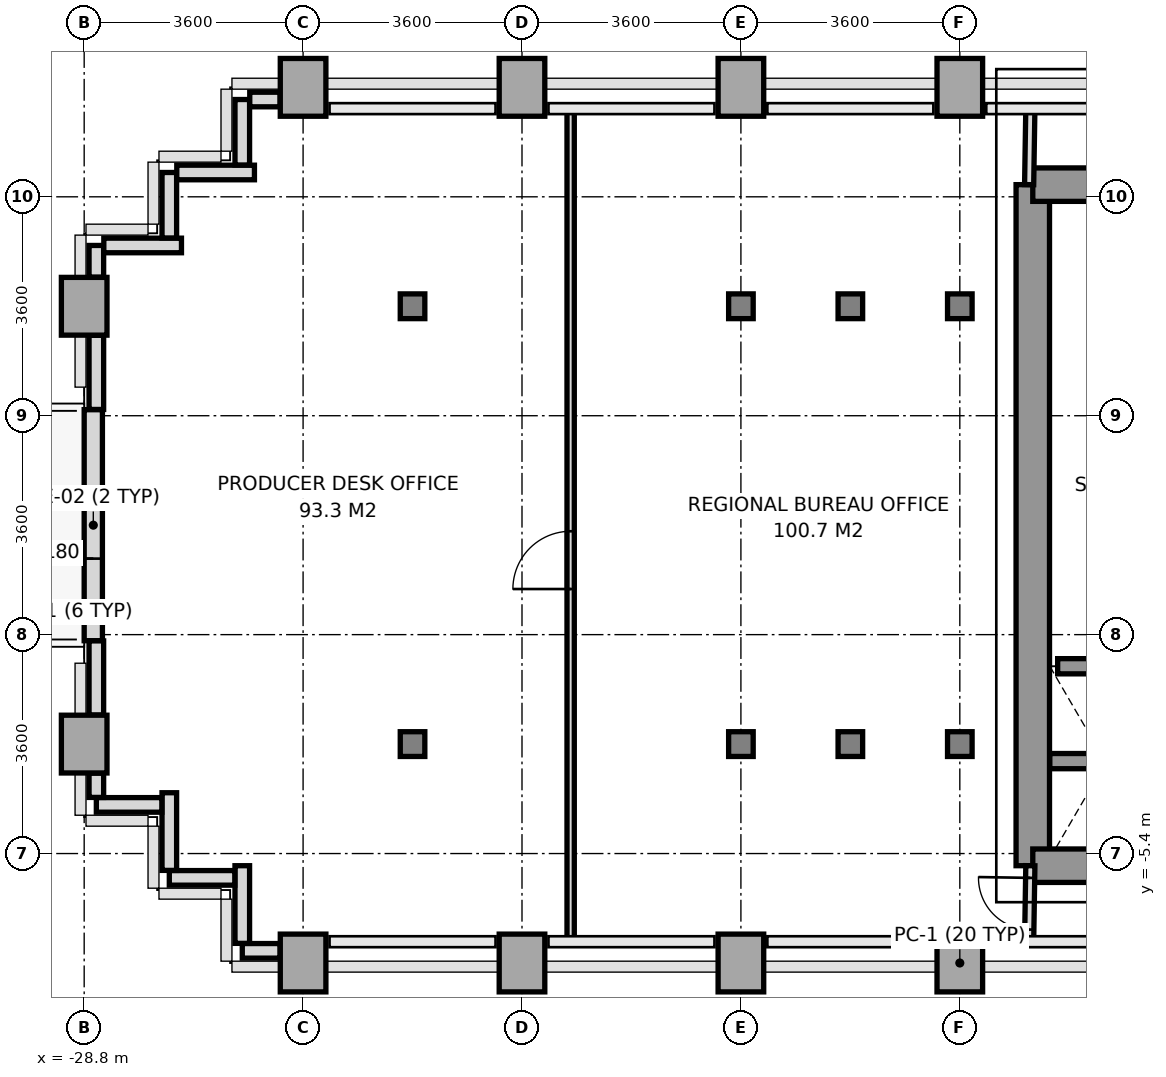
"""IFC4 building model, lengths in metres.
Left out: names, types, materials, properties, quantities, classifications, styles, units other than length and angle.
Written with IfcOpenShell. Run it as: python <this file> out.ifc"""

import sys

from ifc_helpers import new_model, si_unit, direction, frame, frame_2d, origin, origin_2d, place, context, subcontext, project, spatial, rectangle, i_section, extrude, source, transform, mapped, element, fill, save


model = new_model("IFC4")
c1 = context("Model", 3, precision=1e-05, world=origin(), true_north=direction((0.0, 1.0)))
c2 = subcontext(c1, "Body", "Model", "MODEL_VIEW")
j1 = project(units=[si_unit("LENGTHUNIT", "METRE"), si_unit("PLANEANGLEUNIT", "RADIAN")], contexts=[c1])
p1 = place(None, origin())
s1 = spatial("IfcSite", under=j1, at=p1, CompositionType="ELEMENT")
p2 = place(p1, origin())
s2 = spatial("IfcBuilding", under=s1, at=p2, CompositionType="ELEMENT")
p3 = place(p2, frame((0.0, 0.0, 47.6)))
s3 = spatial("IfcBuildingStorey", under=s2, at=p3, CompositionType="ELEMENT", Elevation=47.6)
m1 = source(origin(), c2, "Body", "SweptSolid", [
    extrude(rectangle(XDim=0.75, YDim=0.95, at=origin_2d()), origin(), (0.0, 0.0, 1.0), 3.2),
])
for number, where, z_axis, x_axis in (
    (1, (-28.8, -3.6, 0.0), (0.0, 0.0, 1.0), (1.0, 0.0, 0.0)),
    (2, (-28.8, 3.6, 0.0), (0.0, 0.0, 1.0), (1.0, 0.0, 0.0)),
    (3, (-25.2, -7.2, 0.0), (0.0, 0.0, 1.0), (1.0, 0.0, 0.0)),
    (4, (-25.2, 7.2, 0.0), (0.0, 0.0, 1.0), (1.0, 0.0, 0.0)),
):
    element("IfcColumn", number, at=place(p3, frame(where, z_axis=z_axis, x_axis=x_axis)), inside=s3, PredefinedType="COLUMN", context=c2, shape_type="MappedRepresentation", body=[
        mapped(m1, transform((0.0, 0.0, 0.0), x_axis=(1.0, 0.0, 0.0), y_axis=(0.0, 1.0, 0.0), z_axis=(0.0, 0.0, 1.0), scale=1.0)),
    ])
m2 = source(origin(), c2, "Body", "SweptSolid", [
    extrude(i_section(OverallWidth=0.404, OverallDepth=0.407, WebThickness=0.022, FlangeThickness=0.035, at=origin_2d()), origin(), (0.0, 0.0, 1.0), 3.2),
])
for number, where, z_axis, x_axis in (
    (5, (-23.4, -3.6, 0.0), (0.0, 0.0, 1.0), (1.0, 0.0, 0.0)),
    (6, (-23.4, 3.6, 0.0), (0.0, 0.0, 1.0), (1.0, 0.0, 0.0)),
):
    element("IfcColumn", number, at=place(p3, frame(where, z_axis=z_axis, x_axis=x_axis)), inside=s3, PredefinedType="COLUMN", context=c2, shape_type="MappedRepresentation", body=[
        mapped(m2, transform((0.0, 0.0, 0.0), x_axis=(1.0, 0.0, 0.0), y_axis=(0.0, 1.0, 0.0), z_axis=(0.0, 0.0, 1.0), scale=1.0)),
    ])
for number, where, z_axis, x_axis in (
    (7, (-21.6, -7.2, 0.0), (0.0, 0.0, 1.0), (1.0, 0.0, 0.0)),
    (8, (-21.6, 7.2, 0.0), (0.0, 0.0, 1.0), (1.0, 0.0, 0.0)),
    (9, (-18.0, -7.2, 0.0), (0.0, 0.0, 1.0), (1.0, 0.0, 0.0)),
):
    element("IfcColumn", number, at=place(p3, frame(where, z_axis=z_axis, x_axis=x_axis)), inside=s3, PredefinedType="COLUMN", context=c2, shape_type="MappedRepresentation", body=[
        mapped(m1, transform((0.0, 0.0, 0.0), x_axis=(1.0, 0.0, 0.0), y_axis=(0.0, 1.0, 0.0), z_axis=(0.0, 0.0, 1.0), scale=1.0)),
    ])
for number, where, z_axis, x_axis in (
    (10, (-18.0, -3.6, 0.0), (0.0, 0.0, 1.0), (1.0, 0.0, 0.0)),
    (11, (-18.0, 3.6, 0.0), (0.0, 0.0, 1.0), (1.0, 0.0, 0.0)),
):
    element("IfcColumn", number, at=place(p3, frame(where, z_axis=z_axis, x_axis=x_axis)), inside=s3, PredefinedType="COLUMN", context=c2, shape_type="MappedRepresentation", body=[
        mapped(m2, transform((0.0, 0.0, 0.0), x_axis=(1.0, 0.0, 0.0), y_axis=(0.0, 1.0, 0.0), z_axis=(0.0, 0.0, 1.0), scale=1.0)),
    ])
p4 = place(p3, frame((-18.0, 7.2, 0.0), z_axis=(0.0, 0.0, 1.0), x_axis=(1.0, 0.0, 0.0)))
e12 = element("IfcColumn", 12, at=p4, inside=s3, PredefinedType="COLUMN", context=c2, shape_type="MappedRepresentation", body=[
    mapped(m1, transform((0.0, 0.0, 0.0), x_axis=(1.0, 0.0, 0.0), y_axis=(0.0, 1.0, 0.0), z_axis=(0.0, 0.0, 1.0), scale=1.0)),
])
for number, where, z_axis, x_axis in (
    (13, (-16.2, -3.6, 0.0), (0.0, 0.0, 1.0), (1.0, 0.0, 0.0)),
    (14, (-16.2, 3.6, 0.0), (0.0, 0.0, 1.0), (1.0, 0.0, 0.0)),
):
    element("IfcColumn", number, at=place(p3, frame(where, z_axis=z_axis, x_axis=x_axis)), inside=s3, PredefinedType="COLUMN", context=c2, shape_type="MappedRepresentation", body=[
        mapped(m2, transform((0.0, 0.0, 0.0), x_axis=(1.0, 0.0, 0.0), y_axis=(0.0, 1.0, 0.0), z_axis=(0.0, 0.0, 1.0), scale=1.0)),
    ])
p5 = place(p3, frame((-14.4, -7.2, 0.0), z_axis=(0.0, 0.0, 1.0), x_axis=(1.0, 0.0, 0.0)))
e15 = element("IfcColumn", 15, at=p5, inside=s3, PredefinedType="COLUMN", context=c2, shape_type="MappedRepresentation", body=[
    mapped(m1, transform((0.0, 0.0, 0.0), x_axis=(1.0, 0.0, 0.0), y_axis=(0.0, 1.0, 0.0), z_axis=(0.0, 0.0, 1.0), scale=1.0)),
])
for number, where, z_axis, x_axis in (
    (16, (-14.4, -3.6, 0.0), (0.0, 0.0, 1.0), (1.0, 0.0, 0.0)),
    (17, (-14.4, 3.6, 0.0), (0.0, 0.0, 1.0), (1.0, 0.0, 0.0)),
):
    element("IfcColumn", number, at=place(p3, frame(where, z_axis=z_axis, x_axis=x_axis)), inside=s3, PredefinedType="COLUMN", context=c2, shape_type="MappedRepresentation", body=[
        mapped(m2, transform((0.0, 0.0, 0.0), x_axis=(1.0, 0.0, 0.0), y_axis=(0.0, 1.0, 0.0), z_axis=(0.0, 0.0, 1.0), scale=1.0)),
    ])
p6 = place(p3, frame((-14.4, 7.2, 0.0), z_axis=(0.0, 0.0, 1.0), x_axis=(1.0, 0.0, 0.0)))
e18 = element("IfcColumn", 18, at=p6, inside=s3, PredefinedType="COLUMN", context=c2, shape_type="MappedRepresentation", body=[
    mapped(m1, transform((0.0, 0.0, 0.0), x_axis=(1.0, 0.0, 0.0), y_axis=(0.0, 1.0, 0.0), z_axis=(0.0, 0.0, 1.0), scale=1.0)),
])
p7 = place(p3, frame((-28.65, -1.9, 0.0), z_axis=(0.0, 0.0, 1.0), x_axis=(0.0, 1.0, 0.0)))
e19 = element("IfcWall", 19, at=p7, inside=s3, PredefinedType="SOLIDWALL", context=c2, shape_type="SweptSolid", body=[
    extrude(rectangle(XDim=3.8, YDim=0.3, at=frame_2d((1.9, 0.0))), origin(), (0.0, 0.0, 1.0), 2.45),
])
p8 = place(p7, frame((1.35, 0.0, 0.0)))
e20 = element("IfcOpeningElement", 20, at=p8, cuts=e19, PredefinedType="OPENING", context=c2, shape_type="SweptSolid", body=[
    extrude(rectangle(XDim=1.1, YDim=2.3, at=frame_2d((0.55, 1.15))), frame((0.0, 0.16, 0.0), z_axis=(0.0, -1.0, 0.0), x_axis=(1.0, 0.0, 0.0)), (0.0, 0.0, 1.0), 0.32),
])
p9 = place(p3, frame((-25.578, -7.0, 0.0), z_axis=(0.0, 0.0, 1.0), x_axis=(-1.0, 0.0, 0.0)))
e21 = element("IfcWall", 21, at=p9, inside=s3, PredefinedType="PARAPET", context=c2, shape_type="SweptSolid", body=[
    extrude(rectangle(XDim=0.622, YDim=0.24, at=frame_2d((0.311, 0.0))), origin(), (0.0, 0.0, 1.0), 1.15),
])
p10 = place(p3, frame((-26.2, -6.877, 0.0), z_axis=(0.0, 0.0, 1.0), x_axis=(0.0, 1.0, 0.0)))
e22 = element("IfcWall", 22, at=p10, inside=s3, PredefinedType="PARAPET", context=c2, shape_type="SweptSolid", body=[
    extrude(rectangle(XDim=1.277, YDim=0.24, at=frame_2d((0.638, 0.0))), origin(), (0.0, 0.0, 1.0), 1.15),
])
p11 = place(p3, frame((-26.323, -5.8, 0.0), z_axis=(0.0, 0.0, 1.0), x_axis=(-1.0, 0.0, 0.0)))
e23 = element("IfcWall", 23, at=p11, inside=s3, PredefinedType="PARAPET", context=c2, shape_type="SweptSolid", body=[
    extrude(rectangle(XDim=1.077, YDim=0.24, at=frame_2d((0.539, 0.0))), origin(), (0.0, 0.0, 1.0), 1.15),
])
p12 = place(p3, frame((-27.4, -5.677, 0.0), z_axis=(0.0, 0.0, 1.0), x_axis=(0.0, 1.0, 0.0)))
e24 = element("IfcWall", 24, at=p12, inside=s3, PredefinedType="PARAPET", context=c2, shape_type="SweptSolid", body=[
    extrude(rectangle(XDim=1.277, YDim=0.24, at=frame_2d((0.639, 0.0))), origin(), (0.0, 0.0, 1.0), 1.15),
])
p13 = place(p3, frame((-27.523, -4.6, 0.0), z_axis=(0.0, 0.0, 1.0), x_axis=(-1.0, 0.0, 0.0)))
e25 = element("IfcWall", 25, at=p13, inside=s3, PredefinedType="PARAPET", context=c2, shape_type="SweptSolid", body=[
    extrude(rectangle(XDim=1.077, YDim=0.24, at=frame_2d((0.539, 0.0))), origin(), (0.0, 0.0, 1.0), 1.15),
])
p14 = place(p3, frame((-28.6, -4.477, 0.0), z_axis=(0.0, 0.0, 1.0), x_axis=(0.0, 1.0, 0.0)))
e26 = element("IfcWall", 26, at=p14, inside=s3, PredefinedType="PARAPET", context=c2, shape_type="SweptSolid", body=[
    extrude(rectangle(XDim=0.399, YDim=0.24, at=frame_2d((0.2, 0.0))), origin(), (0.0, 0.0, 1.0), 1.15),
])
for number, where, z_axis, x_axis in (
    (27, (-28.6, -3.122, 0.0), (0.0, 0.0, 1.0), (0.0, 1.0, 0.0)),
    (28, (-28.6, 1.903, 0.0), (0.0, 0.0, 1.0), (0.0, 1.0, 0.0)),
):
    element("IfcWall", number, at=place(p3, frame(where, z_axis=z_axis, x_axis=x_axis)), inside=s3, PredefinedType="PARAPET", context=c2, shape_type="SweptSolid", body=[
        extrude(rectangle(XDim=1.219, YDim=0.24, at=frame_2d((0.609, 0.0))), origin(), (0.0, 0.0, 1.0), 1.15),
    ])
p15 = place(p3, frame((-28.6, 4.078, 0.0), z_axis=(0.0, 0.0, 1.0), x_axis=(0.0, 1.0, 0.0)))
e29 = element("IfcWall", 29, at=p15, inside=s3, PredefinedType="PARAPET", context=c2, shape_type="SweptSolid", body=[
    extrude(rectangle(XDim=0.522, YDim=0.24, at=frame_2d((0.261, 0.0))), origin(), (0.0, 0.0, 1.0), 1.15),
])
p16 = place(p3, frame((-28.477, 4.6, 0.0), z_axis=(0.0, 0.0, 1.0), x_axis=(1.0, 0.0, 0.0)))
e30 = element("IfcWall", 30, at=p16, inside=s3, PredefinedType="PARAPET", context=c2, shape_type="SweptSolid", body=[
    extrude(rectangle(XDim=1.277, YDim=0.24, at=frame_2d((0.639, 0.0))), origin(), (0.0, 0.0, 1.0), 1.15),
])
p17 = place(p3, frame((-27.4, 4.723, 0.0), z_axis=(0.0, 0.0, 1.0), x_axis=(0.0, 1.0, 0.0)))
e31 = element("IfcWall", 31, at=p17, inside=s3, PredefinedType="PARAPET", context=c2, shape_type="SweptSolid", body=[
    extrude(rectangle(XDim=1.077, YDim=0.24, at=frame_2d((0.539, 0.0))), origin(), (0.0, 0.0, 1.0), 1.15),
])
p18 = place(p3, frame((-27.277, 5.8, 0.0), z_axis=(0.0, 0.0, 1.0), x_axis=(1.0, 0.0, 0.0)))
e32 = element("IfcWall", 32, at=p18, inside=s3, PredefinedType="PARAPET", context=c2, shape_type="SweptSolid", body=[
    extrude(rectangle(XDim=1.277, YDim=0.24, at=frame_2d((0.639, 0.0))), origin(), (0.0, 0.0, 1.0), 1.15),
])
p19 = place(p3, frame((-26.2, 5.923, 0.0), z_axis=(0.0, 0.0, 1.0), x_axis=(0.0, 1.0, 0.0)))
e33 = element("IfcWall", 33, at=p19, inside=s3, PredefinedType="PARAPET", context=c2, shape_type="SweptSolid", body=[
    extrude(rectangle(XDim=1.077, YDim=0.24, at=frame_2d((0.539, 0.0))), origin(), (0.0, 0.0, 1.0), 1.15),
])
p20 = place(p3, frame((-26.077, 7.0, 0.0), z_axis=(0.0, 0.0, 1.0), x_axis=(1.0, 0.0, 0.0)))
e34 = element("IfcWall", 34, at=p20, inside=s3, PredefinedType="PARAPET", context=c2, shape_type="SweptSolid", body=[
    extrude(rectangle(XDim=0.499, YDim=0.24, at=frame_2d((0.25, 0.0))), origin(), (0.0, 0.0, 1.0), 1.15),
])
p21 = place(p3, frame((-13.2, -5.6, 0.0), z_axis=(0.0, 0.0, 1.0), x_axis=(0.0, 1.0, 0.0)))
e35 = element("IfcWall", 35, at=p21, inside=s3, PredefinedType="SHEAR", context=c2, shape_type="SweptSolid", body=[
    extrude(rectangle(XDim=11.2, YDim=0.55, at=frame_2d((5.6, 0.0))), origin(), (0.0, 0.0, 1.0), 3.2),
])
p22 = place(p3, frame((-13.2, 5.6, 0.0), z_axis=(0.0, 0.0, 1.0), x_axis=(1.0, 0.0, 0.0)))
e36 = element("IfcWall", 36, at=p22, inside=s3, PredefinedType="SHEAR", context=c2, shape_type="SweptSolid", body=[
    extrude(rectangle(XDim=1.819, YDim=0.55, at=frame_2d((0.909, 0.0))), origin(), (0.0, 0.0, 1.0), 3.2),
])
p23 = place(p3, frame((-13.2, -5.6, 0.0), z_axis=(0.0, 0.0, 1.0), x_axis=(1.0, 0.0, 0.0)))
e37 = element("IfcWall", 37, at=p23, inside=s3, PredefinedType="SHEAR", context=c2, shape_type="SweptSolid", body=[
    extrude(rectangle(XDim=7.8, YDim=0.55, at=frame_2d((3.9, 0.0))), origin(), (0.0, 0.0, 1.0), 3.2),
])
p24 = place(p23, frame((3.6, 0.0, 0.0)))
e38 = element("IfcOpeningElement", 38, at=p24, cuts=e37, PredefinedType="OPENING", context=c2, shape_type="SweptSolid", body=[
    extrude(rectangle(XDim=1.2, YDim=2.2, at=frame_2d((0.6, 1.1))), frame((0.0, 0.285, 0.0), z_axis=(0.0, -1.0, 0.0), x_axis=(1.0, 0.0, 0.0)), (0.0, 0.0, 1.0), 0.57),
])
p25 = place(p3, frame((-12.92, -3.88, 0.0), z_axis=(0.0, 0.0, 1.0), x_axis=(1.0, 0.0, 0.0)))
e39 = element("IfcWall", 39, at=p25, inside=s3, PredefinedType="SOLIDWALL", context=c2, shape_type="SweptSolid", body=[
    extrude(rectangle(XDim=1.84, YDim=0.25, at=frame_2d((0.92, 0.0))), origin(), (0.0, 0.0, 1.0), 3.2),
])
p26 = place(p3, frame((-12.791, -2.32, 0.0), z_axis=(0.0, 0.0, 1.0), x_axis=(1.0, 0.0, 0.0)))
e40 = element("IfcWall", 40, at=p26, inside=s3, PredefinedType="SOLIDWALL", context=c2, shape_type="SweptSolid", body=[
    extrude(rectangle(XDim=1.582, YDim=0.25, at=frame_2d((0.791, 0.0))), origin(), (0.0, 0.0, 1.0), 3.2),
])
p27 = place(p3, frame((-13.26, 5.6, 0.0), z_axis=(0.0, 0.0, 1.0), x_axis=(0.016013571389, 0.999871774545, 0.0)))
e41 = element("IfcWall", 41, at=p27, inside=s3, PredefinedType="PARTITIONING", context=c2, shape_type="SweptSolid", body=[
    extrude(rectangle(XDim=1.25, YDim=0.15, at=frame_2d((0.625, 0.0))), origin(), (0.0, 0.0, 1.0), 3.2),
])
p28 = place(p3, frame((-13.26, -6.85, 0.0), z_axis=(0.0, 0.0, 1.0), x_axis=(0.016013571389, 0.999871774545, 0.0)))
e42 = element("IfcWall", 42, at=p28, inside=s3, PredefinedType="PARTITIONING", context=c2, shape_type="SweptSolid", body=[
    extrude(rectangle(XDim=1.25, YDim=0.15, at=frame_2d((0.625, 0.0))), origin(), (0.0, 0.0, 1.0), 3.2),
])
p29 = place(p28, frame((0.2, 0.0, 0.0)))
e43 = element("IfcOpeningElement", 43, at=p29, cuts=e42, PredefinedType="OPENING", context=c2, shape_type="SweptSolid", body=[
    extrude(rectangle(XDim=0.85, YDim=2.1, at=frame_2d((0.425, 1.05))), frame((0.0, 0.085, 0.0), z_axis=(0.0, -1.0, 0.0), x_axis=(1.0, 0.0, 0.0)), (0.0, 0.0, 1.0), 0.17),
])
p30 = place(p3, frame((-20.8, -6.85, 0.0), z_axis=(0.0, 0.0, 1.0), x_axis=(0.0, 1.0, 0.0)))
e44 = element("IfcWall", 44, at=p30, inside=s3, PredefinedType="PARTITIONING", context=c2, shape_type="SweptSolid", body=[
    extrude(rectangle(XDim=13.7, YDim=0.12, at=frame_2d((6.85, 0.0))), origin(), (0.0, 0.0, 1.0), 2.71),
])
p31 = place(p30, frame((5.8, 0.0, 0.0)))
e45 = element("IfcOpeningElement", 45, at=p31, cuts=e44, PredefinedType="OPENING", context=c2, shape_type="SweptSolid", body=[
    extrude(rectangle(XDim=0.95, YDim=2.15, at=frame_2d((0.475, 1.075))), frame((0.0, 0.07, 0.0), z_axis=(0.0, -1.0, 0.0), x_axis=(1.0, 0.0, 0.0)), (0.0, 0.0, 1.0), 0.14),
])
m3 = source(origin(), c2, "Body", "SweptSolid", [
    extrude(rectangle(XDim=1.1, YDim=2.3, at=frame_2d((0.55, 1.15))), frame((0.0, 0.025, 0.0), z_axis=(0.0, -1.0, 0.0), x_axis=(1.0, 0.0, 0.0)), (0.0, 0.0, 1.0), 0.05),
])
p32 = place(p8, origin())
e46 = element("IfcDoor", 46, at=p32, inside=s3, OperationType="SINGLE_SWING_LEFT", PredefinedType="DOOR", context=c2, shape_type="MappedRepresentation", body=[
    mapped(m3, transform((0.0, 0.0, 0.0), x_axis=(1.0, 0.0, 0.0), y_axis=(0.0, 1.0, 0.0), z_axis=(0.0, 0.0, 1.0), scale=1.0)),
])
fill(e20, e46)
m4 = source(origin(), c2, "Body", "SweptSolid", [
    extrude(rectangle(XDim=0.85, YDim=2.1, at=frame_2d((0.425, 1.05))), frame((0.0, 0.025, 0.0), z_axis=(0.0, -1.0, 0.0), x_axis=(1.0, 0.0, 0.0)), (0.0, 0.0, 1.0), 0.05),
])
p33 = place(p29, origin())
e47 = element("IfcDoor", 47, at=p33, inside=s3, OperationType="SINGLE_SWING_RIGHT", PredefinedType="DOOR", context=c2, shape_type="MappedRepresentation", body=[
    mapped(m4, transform((0.0, 0.0, 0.0), x_axis=(1.0, 0.0, 0.0), y_axis=(0.0, 1.0, 0.0), z_axis=(0.0, 0.0, 1.0), scale=1.0)),
])
fill(e43, e47)
m5 = source(origin(), c2, "Body", "SweptSolid", [
    extrude(rectangle(XDim=0.95, YDim=2.15, at=frame_2d((0.475, 1.075))), frame((0.0, 0.025, 0.0), z_axis=(0.0, -1.0, 0.0), x_axis=(1.0, 0.0, 0.0)), (0.0, 0.0, 1.0), 0.05),
])
p34 = place(p31, origin())
e48 = element("IfcDoor", 48, at=p34, inside=s3, OperationType="SINGLE_SWING_LEFT", PredefinedType="DOOR", context=c2, shape_type="MappedRepresentation", body=[
    mapped(m5, transform((0.0, 0.0, 0.0), x_axis=(1.0, 0.0, 0.0), y_axis=(0.0, 1.0, 0.0), z_axis=(0.0, 0.0, 1.0), scale=1.0)),
])
fill(e45, e48)
save(model, sys.argv[1])
